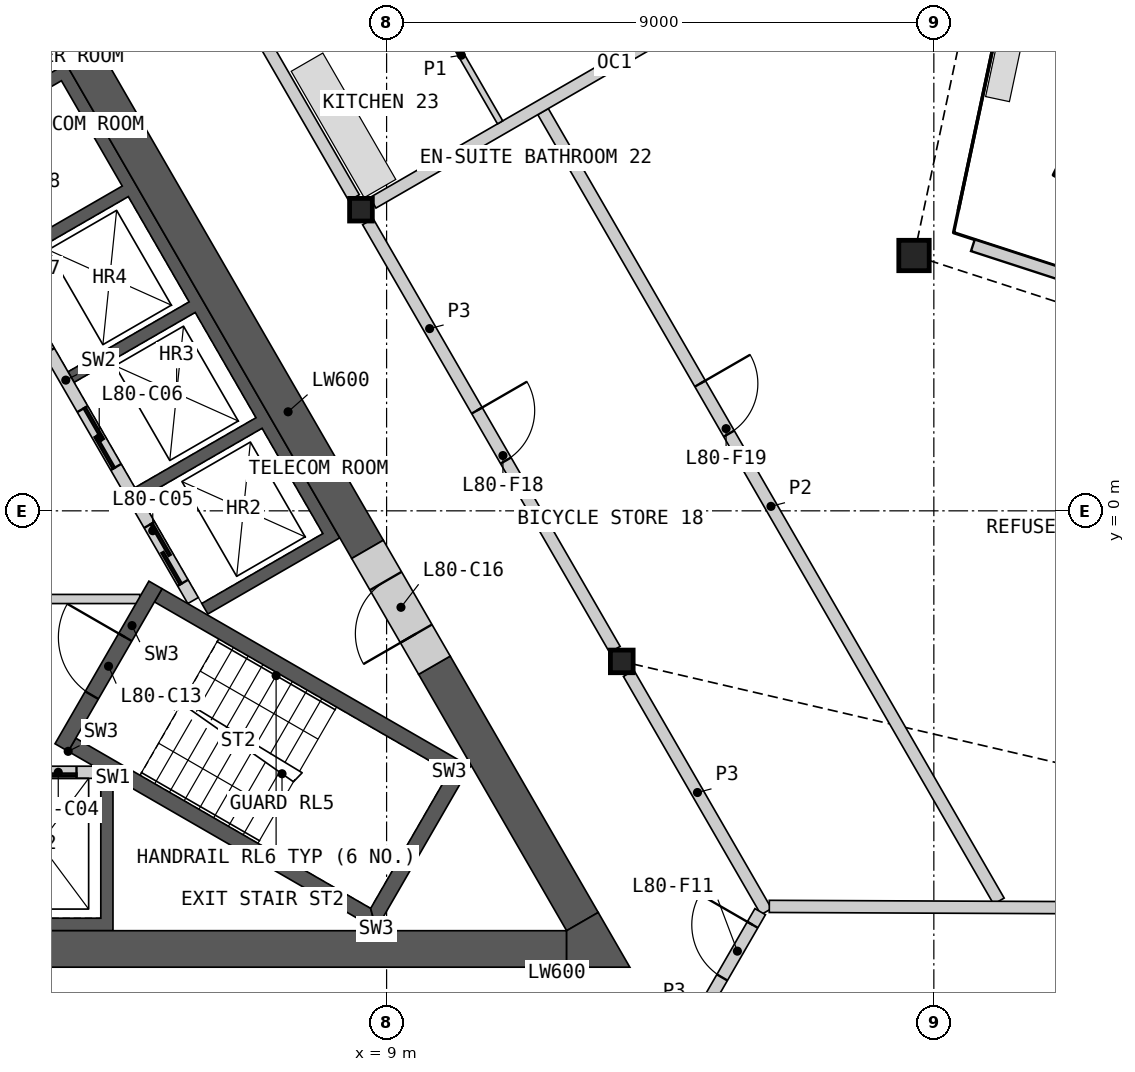
"""IFC4 building model, lengths in metres.
Left out: names, types, materials, properties, quantities, classifications, styles, units other than length and angle.
Written with IfcOpenShell. Run it as: python <this file> out.ifc"""

import sys

from ifc_helpers import new_model, si_unit, direction, frame, frame_2d, origin, origin_2d, place, context, subcontext, project, spatial, polyline, rectangle, hollow_rectangle, i_section, outline, extrude, element, fill, save


model = new_model("IFC4")
c1 = context("Model", 3, precision=1e-05, world=origin(), true_north=direction((0.0, 1.0)))
c2 = subcontext(c1, "Body", "Model", "MODEL_VIEW")
j1 = project(units=[si_unit("LENGTHUNIT", "METRE"), si_unit("PLANEANGLEUNIT", "RADIAN")], contexts=[c1])
p1 = place(None, origin())
s1 = spatial("IfcSite", under=j1, at=p1, CompositionType="ELEMENT")
p2 = place(p1, origin())
s2 = spatial("IfcBuilding", under=s1, at=p2, CompositionType="ELEMENT")
p3 = place(p2, frame((0.0, 0.0, 361.0)))
s3 = spatial("IfcBuildingStorey", under=s2, at=p3, CompositionType="ELEMENT", Elevation=361.0)
p4 = place(p3, frame((17.674, 4.199, 0.0), z_axis=(0.0, 0.0, 1.0), x_axis=(1.0, 0.0, 0.0)))
e1 = element("IfcColumn", 1, at=p4, inside=s3, PredefinedType="COLUMN", context=c2, shape_type="SweptSolid", body=[
    extrude(hollow_rectangle(XDim=0.5, YDim=0.5, WallThickness=0.03, at=origin_2d()), origin(), (0.0, 0.0, 1.0), 3.4),
])
for number, where, z_axis, x_axis in (
    (2, (12.868, -2.476, 0.0), (0.0, 0.0, 1.0), (1.0, 0.0, 0.0)),
    (3, (8.578, 4.953, 0.0), (0.0, 0.0, 1.0), (1.0, 0.0, 0.0)),
):
    element("IfcColumn", number, at=place(p3, frame(where, z_axis=z_axis, x_axis=x_axis)), inside=s3, PredefinedType="COLUMN", context=c2, shape_type="SweptSolid", body=[
        extrude(i_section(OverallWidth=0.374, OverallDepth=0.372, WebThickness=0.016, FlangeThickness=0.026, at=origin_2d()), origin(), (0.0, 0.0, 1.0), 3.4),
    ])
p5 = place(p3, frame((24.601, 2.431, 0.0), z_axis=(0.0, 0.0, 1.0), x_axis=(-0.951060123915, 0.309005891041, 0.0)))
e4 = element("IfcWall", 4, at=p5, inside=s3, PredefinedType="SOLIDWALL", context=c2, shape_type="SweptSolid", body=[
    extrude(rectangle(XDim=6.265, YDim=0.2, at=frame_2d((3.133, 0.0))), origin(), (0.0, 0.0, 1.0), 2.634),
])
p6 = place(p5, frame((2.333, 0.0, 0.0)))
e5 = element("IfcOpeningElement", 5, at=p6, cuts=e4, PredefinedType="OPENING", context=c2, shape_type="SweptSolid", body=[
    extrude(rectangle(XDim=1.6, YDim=2.25, at=frame_2d((0.8, 1.125))), frame((0.0, 0.11, 0.0), z_axis=(0.0, -1.0, 0.0), x_axis=(1.0, 0.0, 0.0)), (0.0, 0.0, 1.0), 0.22),
])
p7 = place(p3, origin())
e6 = element("IfcWall", 6, at=p7, inside=s3, PredefinedType="SHEAR", context=c2, shape_type="SweptSolid", body=[
    extrude(outline(polyline([(4.5, -4.4), (4.5, -6.906), (-4.5, -6.906), (-4.5, -4.4), (-4.3, -4.4), (-4.3, -6.7), (-2.3, -6.7), (-2.3, -4.4), (-2.1, -4.4), (-2.1, -6.7), (-0.1, -6.7), (-0.1, -4.4), (0.1, -4.4), (0.1, -6.7), (2.1, -6.7), (2.1, -4.4), (2.3, -4.4), (2.3, -6.7), (4.3, -6.7), (4.3, -4.4), (4.5, -4.4)])), origin(), (0.0, 0.0, 1.0), 3.1),
])
p8 = place(p3, frame((-4.187, -4.3, 0.0), z_axis=(0.0, 0.0, 1.0), x_axis=(1.0, 0.0, 0.0)))
e7 = element("IfcWall", 7, at=p8, inside=s3, PredefinedType="SOLIDWALL", context=c2, shape_type="SweptSolid", body=[
    extrude(rectangle(XDim=8.373, YDim=0.2, at=frame_2d((4.187, 0.0))), origin(), (0.0, 0.0, 1.0), 3.1),
])
p9 = place(p8, frame((0.287, 0.0, 0.0)))
e8 = element("IfcOpeningElement", 8, at=p9, cuts=e7, PredefinedType="OPENING", context=c2, shape_type="SweptSolid", body=[
    extrude(rectangle(XDim=1.2, YDim=2.1, at=frame_2d((0.6, 1.05))), frame((0.0, 0.11, 0.0), z_axis=(0.0, -1.0, 0.0), x_axis=(1.0, 0.0, 0.0)), (0.0, 0.0, 1.0), 0.22),
])
p10 = place(p8, frame((2.387, 0.0, 0.0)))
e9 = element("IfcOpeningElement", 9, at=p10, cuts=e7, PredefinedType="OPENING", context=c2, shape_type="SweptSolid", body=[
    extrude(rectangle(XDim=1.4, YDim=2.1, at=frame_2d((0.7, 1.05))), frame((0.0, 0.11, 0.0), z_axis=(0.0, -1.0, 0.0), x_axis=(1.0, 0.0, 0.0)), (0.0, 0.0, 1.0), 0.22),
])
p11 = place(p8, frame((4.737, 0.0, 0.0)))
e10 = element("IfcOpeningElement", 10, at=p11, cuts=e7, PredefinedType="OPENING", context=c2, shape_type="SweptSolid", body=[
    extrude(rectangle(XDim=1.1, YDim=2.1, at=frame_2d((0.55, 1.05))), frame((0.0, 0.11, 0.0), z_axis=(0.0, -1.0, 0.0), x_axis=(1.0, 0.0, 0.0)), (0.0, 0.0, 1.0), 0.22),
])
p12 = place(p8, frame((6.887, 0.0, 0.0)))
e11 = element("IfcOpeningElement", 11, at=p12, cuts=e7, PredefinedType="OPENING", context=c2, shape_type="SweptSolid", body=[
    extrude(rectangle(XDim=1.2, YDim=2.1, at=frame_2d((0.6, 1.05))), frame((0.0, 0.11, 0.0), z_axis=(0.0, -1.0, 0.0), x_axis=(1.0, 0.0, 0.0)), (0.0, 0.0, 1.0), 0.22),
])
p13 = place(p3, origin())
e12 = element("IfcWall", 12, at=p13, inside=s3, PredefinedType="SHEAR", context=c2, shape_type="SweptSolid", body=[
    extrude(outline(polyline([(1.561, 6.097), (3.731, 7.35), (8.231, -0.444), (6.061, -1.697), (5.96, -1.524), (7.952, -0.374), (6.952, 1.358), (4.96, 0.208), (4.861, 0.381), (6.852, 1.531), (5.852, 3.263), (3.861, 2.113), (3.76, 2.287), (5.752, 3.437), (4.752, 5.169), (2.76, 4.019), (2.66, 4.192), (4.652, 5.342), (3.652, 7.074), (1.66, 5.924), (1.561, 6.097)])), origin(), (0.0, 0.0, 1.0), 3.1),
])
p14 = place(p3, frame((5.817, -1.476, 0.0), z_axis=(0.0, 0.0, 1.0), x_axis=(-0.500002616675, 0.866023893041, 0.0)))
e13 = element("IfcWall", 13, at=p14, inside=s3, PredefinedType="SOLIDWALL", context=c2, shape_type="SweptSolid", body=[
    extrude(rectangle(XDim=8.373, YDim=0.2, at=frame_2d((4.187, 0.0))), origin(), (0.0, 0.0, 1.0), 3.1),
])
p15 = place(p14, frame((0.337, 0.0, 0.0)))
e14 = element("IfcOpeningElement", 14, at=p15, cuts=e13, PredefinedType="OPENING", context=c2, shape_type="SweptSolid", body=[
    extrude(rectangle(XDim=1.1, YDim=2.1, at=frame_2d((0.55, 1.05))), frame((0.0, 0.11, 0.0), z_axis=(0.0, -1.0, 0.0), x_axis=(1.0, 0.0, 0.0)), (0.0, 0.0, 1.0), 0.22),
])
p16 = place(p14, frame((2.537, 0.0, 0.0)))
e15 = element("IfcOpeningElement", 15, at=p16, cuts=e13, PredefinedType="OPENING", context=c2, shape_type="SweptSolid", body=[
    extrude(rectangle(XDim=1.1, YDim=2.1, at=frame_2d((0.55, 1.05))), frame((0.0, 0.11, 0.0), z_axis=(0.0, -1.0, 0.0), x_axis=(1.0, 0.0, 0.0)), (0.0, 0.0, 1.0), 0.22),
])
p17 = place(p14, frame((4.737, 0.0, 0.0)))
e16 = element("IfcOpeningElement", 16, at=p17, cuts=e13, PredefinedType="OPENING", context=c2, shape_type="SweptSolid", body=[
    extrude(rectangle(XDim=1.1, YDim=2.1, at=frame_2d((0.55, 1.05))), frame((0.0, 0.11, 0.0), z_axis=(0.0, -1.0, 0.0), x_axis=(1.0, 0.0, 0.0)), (0.0, 0.0, 1.0), 0.22),
])
p18 = place(p14, frame((7.037, 0.0, 0.0)))
e17 = element("IfcOpeningElement", 17, at=p18, cuts=e13, PredefinedType="OPENING", context=c2, shape_type="SweptSolid", body=[
    extrude(rectangle(XDim=0.9, YDim=2.1, at=frame_2d((0.45, 1.05))), frame((0.0, 0.11, 0.0), z_axis=(0.0, -1.0, 0.0), x_axis=(1.0, 0.0, 0.0)), (0.0, 0.0, 1.0), 0.22),
])
p19 = place(p3, frame((-4.941, -1.45, 0.0), z_axis=(0.0, 0.0, 1.0), x_axis=(1.0, 0.0, 0.0)))
e18 = element("IfcWall", 18, at=p19, inside=s3, PredefinedType="PARTITIONING", context=c2, shape_type="SweptSolid", body=[
    extrude(rectangle(XDim=9.882, YDim=0.15, at=frame_2d((4.941, 0.0))), origin(), (0.0, 0.0, 1.0), 3.1),
])
p20 = place(p19, frame((4.391, 0.0, 0.0)))
e19 = element("IfcOpeningElement", 19, at=p20, cuts=e18, PredefinedType="OPENING", context=c2, shape_type="SweptSolid", body=[
    extrude(rectangle(XDim=1.1, YDim=2.1, at=frame_2d((0.55, 1.05))), frame((0.0, 0.085, 0.0), z_axis=(0.0, -1.0, 0.0), x_axis=(1.0, 0.0, 0.0)), (0.0, 0.0, 1.0), 0.17),
])
p21 = place(p3, origin())
e20 = element("IfcWall", 20, at=p21, inside=s3, PredefinedType="SHEAR", context=c2, shape_type="SweptSolid", body=[
    extrude(outline(polyline([(3.763, -3.956), (8.83, -6.881), (8.738, -6.539), (3.888, -3.739), (3.763, -3.956)])), origin(), (0.0, 0.0, 1.0), 3.1),
])
p22 = place(p3, origin())
e21 = element("IfcWall", 21, at=p22, inside=s3, PredefinedType="SHEAR", context=c2, shape_type="SweptSolid", body=[
    extrude(outline(polyline([(8.83, -6.881), (10.374, -4.206), (10.032, -4.298), (8.738, -6.539), (8.83, -6.881)])), origin(), (0.0, 0.0, 1.0), 3.1),
])
p23 = place(p3, origin())
e22 = element("IfcWall", 22, at=p23, inside=s3, PredefinedType="SHEAR", context=c2, shape_type="SweptSolid", body=[
    extrude(outline(polyline([(10.032, -4.298), (10.374, -4.206), (5.307, -1.281), (5.182, -1.498), (10.032, -4.298)])), origin(), (0.0, 0.0, 1.0), 3.1),
])
p24 = place(p3, frame((3.655, -3.893, 0.0), z_axis=(0.0, 0.0, 1.0), x_axis=(0.499982516597, 0.866035497597, 0.0)))
e23 = element("IfcWall", 23, at=p24, inside=s3, PredefinedType="SHEAR", context=c2, shape_type="SweptSolid", body=[
    extrude(rectangle(XDim=3.088, YDim=0.25, at=frame_2d((1.544, 0.0))), origin(), (0.0, 0.0, 1.0), 3.1),
])
p25 = place(p24, frame((0.994, 0.0, 0.0)))
e24 = element("IfcOpeningElement", 24, at=p25, cuts=e23, PredefinedType="OPENING", context=c2, shape_type="SweptSolid", body=[
    extrude(rectangle(XDim=1.1, YDim=2.1, at=frame_2d((0.55, 1.05))), frame((0.0, 0.135, 0.0), z_axis=(0.0, -1.0, 0.0), x_axis=(1.0, 0.0, 0.0)), (0.0, 0.0, 1.0), 0.27),
])
p26 = place(p3, frame((-11.961, -7.206, 0.0), z_axis=(0.0, 0.0, 1.0), x_axis=(1.0, 0.0, 0.0)))
e25 = element("IfcWall", 25, at=p26, inside=s3, PredefinedType="SHEAR", context=c2, shape_type="SweptSolid", body=[
    extrude(rectangle(XDim=23.921, YDim=0.6, at=frame_2d((11.961, 0.0))), origin(), (0.0, 0.0, 1.0), 3.1),
])
p27 = place(p3, frame((8.686, -0.634, 0.0), z_axis=(0.0, 0.0, 1.0), x_axis=(-0.50001836461, 0.866014800712, 0.0)))
e26 = element("IfcWall", 26, at=p27, inside=s3, PredefinedType="SHEAR", context=c2, shape_type="SweptSolid", body=[
    extrude(rectangle(XDim=10.451, YDim=0.6, at=frame_2d((5.225, 0.0))), origin(), (0.0, 0.0, 1.0), 3.1),
])
p28 = place(p3, frame((12.221, -6.756, 0.0), z_axis=(0.0, 0.0, 1.0), x_axis=(-0.50000604952, 0.866021911064, 0.0)))
e27 = element("IfcWall", 27, at=p28, inside=s3, PredefinedType="SHEAR", context=c2, shape_type="SweptSolid", body=[
    extrude(rectangle(XDim=4.869, YDim=0.6, at=frame_2d((2.434, 0.0))), origin(), (0.0, 0.0, 1.0), 3.1),
])
p29 = place(p3, origin())
e28 = element("IfcWall", 28, at=p29, inside=s3, PredefinedType="SHEAR", context=c2, shape_type="SweptSolid", body=[
    extrude(outline(polyline([(11.961, -7.506), (11.961, -6.906), (12.48, -6.606), (13.0, -7.506), (11.961, -7.506)])), origin(), (0.0, 0.0, 1.0), 3.1),
])
p30 = place(p3, frame((9.786, -2.539, 0.0), z_axis=(0.0, 0.0, 1.0), x_axis=(-0.499981787252, 0.866035918664, 0.0)))
e29 = element("IfcWall", 29, at=p30, inside=s3, PredefinedType="SHEAR", context=c2, shape_type="SweptSolid", body=[
    extrude(rectangle(XDim=2.2, YDim=0.6, at=frame_2d((1.1, 0.0))), origin(), (0.0, 0.0, 1.0), 3.1),
])
p31 = place(p30, frame((0.6, 0.0, 0.0)))
e30 = element("IfcOpeningElement", 30, at=p31, cuts=e29, PredefinedType="OPENING", context=c2, shape_type="SweptSolid", body=[
    extrude(rectangle(XDim=1.0, YDim=2.1, at=frame_2d((0.5, 1.05))), frame((0.0, 0.31, 0.0), z_axis=(0.0, -1.0, 0.0), x_axis=(1.0, 0.0, 0.0)), (0.0, 0.0, 1.0), 0.62),
])
p32 = place(p3, frame((4.403, 12.185, 0.0), z_axis=(0.0, 0.0, 1.0), x_axis=(0.499992155518, -0.866029932751, 0.0)))
e31 = element("IfcWall", 31, at=p32, inside=s3, PredefinedType="PARTITIONING", context=c2, shape_type="SweptSolid", body=[
    extrude(rectangle(XDim=8.123, YDim=0.2, at=frame_2d((4.062, 0.0))), origin(), (0.0, 0.0, 1.0), 3.1),
])
p33 = place(p32, frame((3.762, 0.0, 0.0)))
e32 = element("IfcOpeningElement", 32, at=p33, cuts=e31, PredefinedType="OPENING", context=c2, shape_type="SweptSolid", body=[
    extrude(rectangle(XDim=1.0, YDim=2.1, at=frame_2d((0.5, 1.05))), frame((0.0, 0.11, 0.0), z_axis=(0.0, -1.0, 0.0), x_axis=(1.0, 0.0, 0.0)), (0.0, 0.0, 1.0), 0.22),
])
p34 = place(p3, frame((8.692, 4.756, 0.0), z_axis=(0.0, 0.0, 1.0), x_axis=(0.500001682468, -0.866024432409, 0.0)))
e33 = element("IfcWall", 33, at=p34, inside=s3, PredefinedType="PARTITIONING", context=c2, shape_type="SweptSolid", body=[
    extrude(rectangle(XDim=8.124, YDim=0.2, at=frame_2d((4.062, 0.0))), origin(), (0.0, 0.0, 1.0), 3.1),
])
p35 = place(p34, frame((3.587, 0.0, 0.0)))
e34 = element("IfcOpeningElement", 34, at=p35, cuts=e33, PredefinedType="OPENING", context=c2, shape_type="SweptSolid", body=[
    extrude(rectangle(XDim=0.95, YDim=2.1, at=frame_2d((0.475, 1.05))), frame((0.0, 0.11, 0.0), z_axis=(0.0, -1.0, 0.0), x_axis=(1.0, 0.0, 0.0)), (0.0, 0.0, 1.0), 0.22),
])
p36 = place(p3, frame((12.981, -2.673, 0.0), z_axis=(0.0, 0.0, 1.0), x_axis=(0.499974648164, -0.866040040179, 0.0)))
e35 = element("IfcWall", 35, at=p36, inside=s3, PredefinedType="PARTITIONING", context=c2, shape_type="SweptSolid", body=[
    extrude(rectangle(XDim=4.525, YDim=0.2, at=frame_2d((2.263, 0.0))), origin(), (0.0, 0.0, 1.0), 3.1),
])
p37 = place(p3, frame((13.293, -9.797, 0.0), z_axis=(0.0, 0.0, 1.0), x_axis=(0.499977520935, 0.86603838169, 0.0)))
e36 = element("IfcWall", 36, at=p37, inside=s3, PredefinedType="PARTITIONING", context=c2, shape_type="SweptSolid", body=[
    extrude(rectangle(XDim=3.701, YDim=0.2, at=frame_2d((1.851, 0.0))), origin(), (0.0, 0.0, 1.0), 3.1),
])
p38 = place(p37, frame((2.451, 0.0, 0.0)))
e37 = element("IfcOpeningElement", 37, at=p38, cuts=e36, PredefinedType="OPENING", context=c2, shape_type="SweptSolid", body=[
    extrude(rectangle(XDim=1.0, YDim=2.1, at=frame_2d((0.5, 1.05))), frame((0.0, 0.11, 0.0), z_axis=(0.0, -1.0, 0.0), x_axis=(1.0, 0.0, 0.0)), (0.0, 0.0, 1.0), 0.22),
])
p39 = place(p3, frame((11.573, 6.566, 0.0), z_axis=(0.0, 0.0, 1.0), x_axis=(0.499993542657, -0.866029131901, 0.0)))
e38 = element("IfcWall", 38, at=p39, inside=s3, PredefinedType="PARTITIONING", context=c2, shape_type="SweptSolid", body=[
    extrude(rectangle(XDim=14.994, YDim=0.2, at=frame_2d((7.497, 0.0))), origin(), (0.0, 0.0, 1.0), 2.33),
])
p40 = place(p39, frame((5.166, 0.0, 0.0)))
e39 = element("IfcOpeningElement", 39, at=p40, cuts=e38, PredefinedType="OPENING", context=c2, shape_type="SweptSolid", body=[
    extrude(rectangle(XDim=0.95, YDim=2.1, at=frame_2d((0.475, 1.05))), frame((0.0, 0.11, 0.0), z_axis=(0.0, -1.0, 0.0), x_axis=(1.0, 0.0, 0.0)), (0.0, 0.0, 1.0), 0.22),
])
p41 = place(p3, frame((15.294, -6.506, 0.0), z_axis=(0.0, 0.0, 1.0), x_axis=(0.99999116141, -0.004204414611, 0.0)))
e40 = element("IfcWall", 40, at=p41, inside=s3, PredefinedType="PARTITIONING", context=c2, shape_type="SweptSolid", body=[
    extrude(rectangle(XDim=14.807, YDim=0.2, at=frame_2d((7.404, 0.0))), origin(), (0.0, 0.0, 1.0), 2.33),
])
p42 = place(p3, frame((8.775, 5.066, 0.0), z_axis=(0.0, 0.0, 1.0), x_axis=(0.866023724155, 0.500002909193, 0.0)))
e41 = element("IfcWall", 41, at=p42, inside=s3, PredefinedType="PARTITIONING", context=c2, shape_type="SweptSolid", body=[
    extrude(rectangle(XDim=11.655, YDim=0.2, at=frame_2d((5.827, 0.0))), origin(), (0.0, 0.0, 1.0), 2.33),
])
p43 = place(p3, frame((9.592, 8.598, 0.0), z_axis=(0.0, 0.0, 1.0), x_axis=(0.499990435942, -0.866030925526, 0.0)))
e42 = element("IfcWall", 42, at=p43, inside=s3, PredefinedType="PARTITIONING", context=c2, shape_type="SweptSolid", body=[
    extrude(rectangle(XDim=2.55, YDim=0.1, at=frame_2d((1.275, 0.0))), origin(), (0.0, 0.0, 1.0), 2.33),
])
p44 = place(p43, frame((0.25, 0.0, 0.0)))
e43 = element("IfcOpeningElement", 43, at=p44, cuts=e42, PredefinedType="OPENING", context=c2, shape_type="SweptSolid", body=[
    extrude(rectangle(XDim=0.95, YDim=2.1, at=frame_2d((0.475, 1.05))), frame((0.0, 0.06, 0.0), z_axis=(0.0, -1.0, 0.0), x_axis=(1.0, 0.0, 0.0)), (0.0, 0.0, 1.0), 0.12),
])
p45 = place(p12, origin())
e44 = element("IfcDoor", 44, at=p45, inside=s3, OperationType="SLIDING_TO_LEFT", PredefinedType="DOOR", context=c2, shape_type="SweptSolid", body=[
    extrude(rectangle(XDim=1.2, YDim=2.1, at=frame_2d((0.6, 1.05))), frame((0.0, 0.025, 0.0), z_axis=(0.0, -1.0, 0.0), x_axis=(1.0, 0.0, 0.0)), (0.0, 0.0, 1.0), 0.05),
])
fill(e11, e44)
p46 = place(p15, origin())
e45 = element("IfcDoor", 45, at=p46, inside=s3, OperationType="SLIDING_TO_LEFT", PredefinedType="DOOR", context=c2, shape_type="SweptSolid", body=[
    extrude(rectangle(XDim=1.1, YDim=2.1, at=frame_2d((0.55, 1.05))), frame((0.0, 0.025, 0.0), z_axis=(0.0, -1.0, 0.0), x_axis=(1.0, 0.0, 0.0)), (0.0, 0.0, 1.0), 0.05),
])
fill(e14, e45)
p47 = place(p16, origin())
e46 = element("IfcDoor", 46, at=p47, inside=s3, OperationType="SLIDING_TO_LEFT", PredefinedType="DOOR", context=c2, shape_type="SweptSolid", body=[
    extrude(rectangle(XDim=1.1, YDim=2.1, at=frame_2d((0.55, 1.05))), frame((0.0, 0.025, 0.0), z_axis=(0.0, -1.0, 0.0), x_axis=(1.0, 0.0, 0.0)), (0.0, 0.0, 1.0), 0.05),
])
fill(e15, e46)
p48 = place(p25, origin())
e47 = element("IfcDoor", 47, at=p48, inside=s3, OperationType="SINGLE_SWING_RIGHT", PredefinedType="DOOR", context=c2, shape_type="SweptSolid", body=[
    extrude(rectangle(XDim=1.1, YDim=2.1, at=frame_2d((0.55, 1.05))), frame((0.0, 0.025, 0.0), z_axis=(0.0, -1.0, 0.0), x_axis=(1.0, 0.0, 0.0)), (0.0, 0.0, 1.0), 0.05),
])
fill(e24, e47)
p49 = place(p31, origin())
e48 = element("IfcDoor", 48, at=p49, inside=s3, OperationType="SINGLE_SWING_LEFT", PredefinedType="DOOR", context=c2, shape_type="SweptSolid", body=[
    extrude(rectangle(XDim=1.0, YDim=2.1, at=frame_2d((0.5, 1.05))), frame((0.0, 0.055, 0.0), z_axis=(0.0, -1.0, 0.0), x_axis=(1.0, 0.0, 0.0)), (0.0, 0.0, 1.0), 0.05),
])
fill(e30, e48)
p50 = place(p38, origin())
e49 = element("IfcDoor", 49, at=p50, inside=s3, OperationType="SINGLE_SWING_RIGHT", PredefinedType="DOOR", context=c2, shape_type="SweptSolid", body=[
    extrude(rectangle(XDim=1.0, YDim=2.1, at=frame_2d((0.5, 1.05))), frame((0.0, 0.025, 0.0), z_axis=(0.0, -1.0, 0.0), x_axis=(1.0, 0.0, 0.0)), (0.0, 0.0, 1.0), 0.05),
])
fill(e37, e49)
p51 = place(p35, origin())
e50 = element("IfcDoor", 50, at=p51, inside=s3, OperationType="SINGLE_SWING_LEFT", PredefinedType="DOOR", context=c2, shape_type="SweptSolid", body=[
    extrude(rectangle(XDim=0.95, YDim=2.1, at=frame_2d((0.475, 1.05))), frame((0.0, 0.025, 0.0), z_axis=(0.0, -1.0, 0.0), x_axis=(1.0, 0.0, 0.0)), (0.0, 0.0, 1.0), 0.05),
])
fill(e34, e50)
p52 = place(p40, origin())
e51 = element("IfcDoor", 51, at=p52, inside=s3, OperationType="SINGLE_SWING_LEFT", PredefinedType="DOOR", context=c2, shape_type="SweptSolid", body=[
    extrude(rectangle(XDim=0.95, YDim=2.1, at=frame_2d((0.475, 1.05))), frame((0.0, 0.025, 0.0), z_axis=(0.0, -1.0, 0.0), x_axis=(1.0, 0.0, 0.0)), (0.0, 0.0, 1.0), 0.05),
])
fill(e39, e51)
p53 = place(p44, origin())
e52 = element("IfcDoor", 52, at=p53, inside=s3, OperationType="SINGLE_SWING_LEFT", PredefinedType="DOOR", context=c2, shape_type="SweptSolid", body=[
    extrude(rectangle(XDim=0.95, YDim=2.1, at=frame_2d((0.475, 1.05))), frame((0.0, 0.025, 0.0), z_axis=(0.0, -1.0, 0.0), x_axis=(1.0, 0.0, 0.0)), (0.0, 0.0, 1.0), 0.05),
])
fill(e43, e52)
save(model, sys.argv[1])
